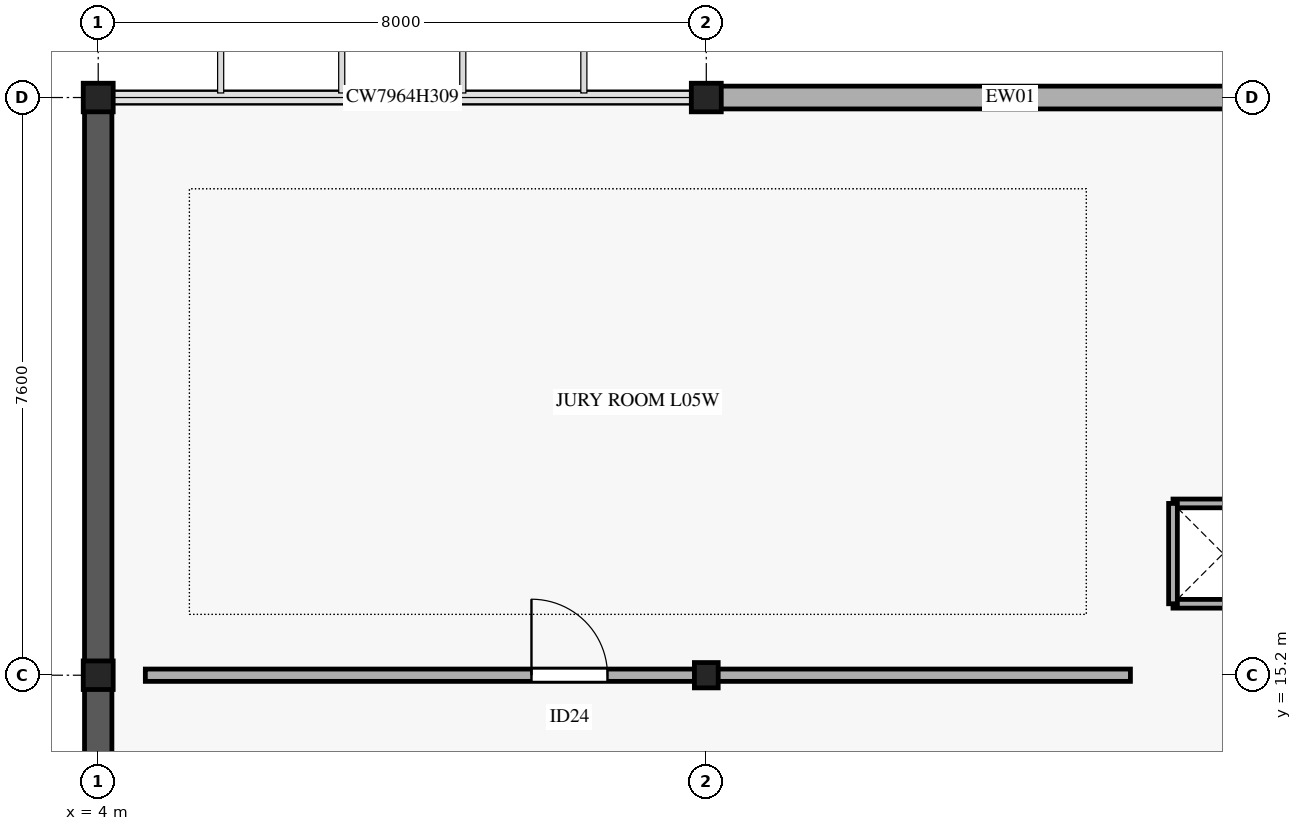
"""IFC4 building model, lengths in metres.
Left out: names, types, materials, properties, quantities, classifications, styles, units other than length and angle.
Written with IfcOpenShell. Run it as: python <this file> out.ifc"""

import sys

from ifc_helpers import new_model, si_unit, direction, frame, frame_2d, origin, origin_2d, place, context, subcontext, project, spatial, rectangle, i_section, extrude, element, fill, save


model = new_model("IFC4")
c1 = context("Model", 3, precision=1e-05, world=origin(), true_north=direction((0.0, 1.0)))
c2 = subcontext(c1, "Body", "Model", "MODEL_VIEW")
j1 = project(units=[si_unit("LENGTHUNIT", "METRE"), si_unit("PLANEANGLEUNIT", "RADIAN")], contexts=[c1])
p1 = place(None, origin())
s1 = spatial("IfcSite", under=j1, at=p1, CompositionType="ELEMENT")
p2 = place(p1, origin())
s2 = spatial("IfcBuilding", under=s1, at=p2, CompositionType="ELEMENT")
p3 = place(p2, frame((0.0, 0.0, 25.2)))
s3 = spatial("IfcBuildingStorey", under=s2, at=p3, CompositionType="ELEMENT", Elevation=25.2)
for number, where, z_axis, x_axis in (
    (1, (4.0, 15.2, 0.0), (0.0, 0.0, 1.0), (1.0, 0.0, 0.0)),
    (2, (4.0, 22.8, 0.0), (0.0, 0.0, 1.0), (1.0, 0.0, 0.0)),
):
    element("IfcColumn", number, at=place(p3, frame(where, z_axis=z_axis, x_axis=x_axis)), inside=s3, PredefinedType="COLUMN", context=c2, shape_type="SweptSolid", body=[
        extrude(i_section(OverallWidth=0.394, OverallDepth=0.376, WebThickness=0.017, FlangeThickness=0.028, FilletRadius=0.015, at=origin_2d()), origin(), (0.0, 0.0, 1.0), 3.995),
    ])
p4 = place(p3, frame((12.0, 15.2, 0.0), z_axis=(0.0, 0.0, 1.0), x_axis=(1.0, 0.0, 0.0)))
e3 = element("IfcColumn", 3, at=p4, inside=s3, PredefinedType="COLUMN", context=c2, shape_type="SweptSolid", body=[
    extrude(i_section(OverallWidth=0.313, OverallDepth=0.333, WebThickness=0.018, FlangeThickness=0.028, FilletRadius=0.015, at=origin_2d()), origin(), (0.0, 0.0, 1.0), 3.995),
])
p5 = place(p3, frame((12.0, 22.8, 0.0), z_axis=(0.0, 0.0, 1.0), x_axis=(1.0, 0.0, 0.0)))
e4 = element("IfcColumn", 4, at=p5, inside=s3, PredefinedType="COLUMN", context=c2, shape_type="SweptSolid", body=[
    extrude(i_section(OverallWidth=0.394, OverallDepth=0.376, WebThickness=0.017, FlangeThickness=0.028, FilletRadius=0.015, at=origin_2d()), origin(), (0.0, 0.0, 1.0), 3.995),
])
p6 = place(p3, frame((4.0, 7.58, 0.0), z_axis=(0.0, 0.0, 1.0), x_axis=(0.0, 1.0, 0.0)))
e5 = element("IfcWall", 5, at=p6, inside=s3, PredefinedType="STANDARD", context=c2, shape_type="SweptSolid", body=[
    extrude(rectangle(XDim=7.64, YDim=0.36, at=frame_2d((3.82, 0.0))), origin(), (0.0, 0.0, 1.0), 4.0),
])
p7 = place(p3, frame((4.0, 15.18, 0.0), z_axis=(0.0, 0.0, 1.0), x_axis=(0.0, 1.0, 0.0)))
e6 = element("IfcWall", 6, at=p7, inside=s3, PredefinedType="STANDARD", context=c2, shape_type="SweptSolid", body=[
    extrude(rectangle(XDim=7.64, YDim=0.36, at=frame_2d((3.82, 0.0))), origin(), (0.0, 0.0, 1.0), 4.0),
])
p8 = place(p3, frame((11.98, 22.8, 0.0), z_axis=(0.0, 0.0, 1.0), x_axis=(1.0, 0.0, 0.0)))
e7 = element("IfcWall", 7, at=p8, inside=s3, PredefinedType="STANDARD", context=c2, shape_type="SweptSolid", body=[
    extrude(rectangle(XDim=8.04, YDim=0.3, at=frame_2d((4.02, 0.0))), origin(), (0.0, 0.0, 1.0), 3.06),
])
for number, where, z_axis, x_axis in (
    (8, (18.14, 16.14, 0.0), (0.0, 0.0, 1.0), (1.0, 0.0, 0.0)),
    (9, (19.46, 17.46, 0.0), (0.0, 0.0, 1.0), (-1.0, 0.0, 0.0)),
    (10, (18.14, 17.46, 0.0), (0.0, 0.0, 1.0), (0.0, -1.0, 0.0)),
):
    element("IfcWall", number, at=place(p3, frame(where, z_axis=z_axis, x_axis=x_axis)), inside=s3, PredefinedType="PARTITIONING", context=c2, shape_type="SweptSolid", body=[
        extrude(rectangle(XDim=1.32, YDim=0.115, at=frame_2d((0.66, 0.0))), origin(), (0.0, 0.0, 1.0), 3.15),
    ])
p9 = place(p3, frame((4.62, 15.2, 0.0), z_axis=(0.0, 0.0, 1.0), x_axis=(1.0, 0.0, 0.0)))
e11 = element("IfcWall", 11, at=p9, inside=s3, PredefinedType="PARTITIONING", context=c2, shape_type="SweptSolid", body=[
    extrude(rectangle(XDim=12.96, YDim=0.162, at=frame_2d((6.48, 0.0))), origin(), (0.0, 0.0, 1.0), 2.85),
])
p10 = place(p9, frame((5.08, 0.0, 0.0)))
e12 = element("IfcOpeningElement", 12, at=p10, cuts=e11, PredefinedType="OPENING", context=c2, shape_type="SweptSolid", body=[
    extrude(rectangle(XDim=1.0, YDim=2.15, at=frame_2d((0.5, 1.075))), frame((0.0, 0.091, 0.0), z_axis=(0.0, -1.0, 0.0), x_axis=(1.0, 0.0, 0.0)), (0.0, 0.0, 1.0), 0.182),
])
p11 = place(p10, origin())
e13 = element("IfcDoor", 13, at=p11, inside=s3, OperationType="SINGLE_SWING_LEFT", PredefinedType="DOOR", context=c2, shape_type="SweptSolid", body=[
    extrude(rectangle(XDim=1.0, YDim=2.15, at=frame_2d((0.5, 1.075))), frame((0.0, 0.025, 0.0), z_axis=(0.0, -1.0, 0.0), x_axis=(1.0, 0.0, 0.0)), (0.0, 0.0, 1.0), 0.05),
])
fill(e12, e13)
save(model, sys.argv[1])
